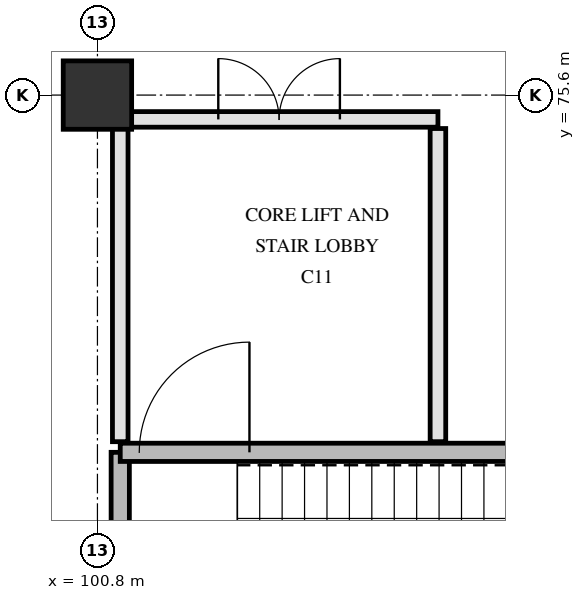
"""IFC4 building model, lengths in metres.
Left out: names, types, materials, properties, quantities, classifications, styles, units other than length and angle.
Written with IfcOpenShell. Run it as: python <this file> out.ifc"""

import sys

from ifc_helpers import new_model, si_unit, direction, frame, frame_2d, origin, origin_2d, place, context, subcontext, project, spatial, rectangle, extrude, element, fill, save


model = new_model("IFC4")
c1 = context("Model", 3, precision=1e-05, world=origin(), true_north=direction((0.0, 1.0)))
c2 = subcontext(c1, "Body", "Model", "MODEL_VIEW")
j1 = project(units=[si_unit("LENGTHUNIT", "METRE"), si_unit("PLANEANGLEUNIT", "RADIAN")], contexts=[c1])
p1 = place(None, origin())
s1 = spatial("IfcSite", under=j1, at=p1, CompositionType="ELEMENT")
p2 = place(p1, origin())
s2 = spatial("IfcBuilding", under=s1, at=p2, CompositionType="ELEMENT")
p3 = place(p2, frame((0.0, 0.0, -5.4)))
s3 = spatial("IfcBuildingStorey", under=s2, at=p3, CompositionType="ELEMENT", Elevation=-5.4)
p4 = place(p3, frame((100.8, 75.6, 0.0), z_axis=(0.0, 0.0, 1.0), x_axis=(1.0, 0.0, 0.0)))
e1 = element("IfcColumn", 1, at=p4, inside=s3, PredefinedType="COLUMN", context=c2, shape_type="SweptSolid", body=[
    extrude(rectangle(XDim=0.9, YDim=0.9, at=origin_2d()), origin(), (0.0, 0.0, 1.0), 5.4),
])
p5 = place(p3, frame((101.1, 67.58, 0.0), z_axis=(0.0, 0.0, 1.0), x_axis=(0.0, 1.0, 0.0)))
e2 = element("IfcWall", 2, at=p5, inside=s3, PredefinedType="SHEAR", context=c2, shape_type="SweptSolid", body=[
    extrude(rectangle(XDim=3.32, YDim=0.24, at=frame_2d((1.66, 0.0))), origin(), (0.0, 0.0, 1.0), 5.08),
])
p6 = place(p3, frame((101.1, 70.9, 0.0), z_axis=(0.0, 0.0, 1.0), x_axis=(1.0, 0.0, 0.0)))
e3 = element("IfcWall", 3, at=p6, inside=s3, PredefinedType="SHEAR", context=c2, shape_type="SweptSolid", body=[
    extrude(rectangle(XDim=7.82, YDim=0.24, at=frame_2d((3.91, 0.0))), origin(), (0.0, 0.0, 1.0), 5.08),
])
p7 = place(p6, frame((0.25, 0.0, 0.0)))
e4 = element("IfcOpeningElement", 4, at=p7, cuts=e3, PredefinedType="OPENING", context=c2, shape_type="SweptSolid", body=[
    extrude(rectangle(XDim=1.45, YDim=2.2, at=frame_2d((0.725, 1.1))), frame((0.0, 0.13, 0.0), z_axis=(0.0, -1.0, 0.0), x_axis=(1.0, 0.0, 0.0)), (0.0, 0.0, 1.0), 0.26),
])
p8 = place(p3, frame((105.28, 71.04, 0.0), z_axis=(0.0, 0.0, 1.0), x_axis=(0.0, 1.0, 0.0)))
e5 = element("IfcWall", 5, at=p8, inside=s3, PredefinedType="PARTITIONING", context=c2, shape_type="SweptSolid", body=[
    extrude(rectangle(XDim=4.12, YDim=0.205, at=frame_2d((2.06, 0.0))), origin(), (0.0, 0.0, 1.0), 5.07),
])
p9 = place(p3, frame((101.1, 71.04, 0.0), z_axis=(0.0, 0.0, 1.0), x_axis=(0.0, 1.0, 0.0)))
e6 = element("IfcWall", 6, at=p9, inside=s3, PredefinedType="PARTITIONING", context=c2, shape_type="SweptSolid", body=[
    extrude(rectangle(XDim=4.12, YDim=0.205, at=frame_2d((2.06, 0.0))), origin(), (0.0, 0.0, 1.0), 4.47),
])
p10 = place(p3, frame((101.1, 75.28, 0.0), z_axis=(0.0, 0.0, 1.0), x_axis=(1.0, 0.0, 0.0)))
e7 = element("IfcWall", 7, at=p10, inside=s3, PredefinedType="PARTITIONING", context=c2, shape_type="SweptSolid", body=[
    extrude(rectangle(XDim=4.18, YDim=0.205, at=frame_2d((2.09, 0.0))), origin(), (0.0, 0.0, 1.0), 4.42),
])
p11 = place(p10, frame((1.29, 0.0, 0.0)))
e8 = element("IfcOpeningElement", 8, at=p11, cuts=e7, PredefinedType="OPENING", context=c2, shape_type="SweptSolid", body=[
    extrude(rectangle(XDim=1.6, YDim=2.25, at=frame_2d((0.8, 1.125))), frame((0.0, 0.113, 0.0), z_axis=(0.0, -1.0, 0.0), x_axis=(1.0, 0.0, 0.0)), (0.0, 0.0, 1.0), 0.225),
])
p12 = place(p7, origin())
e9 = element("IfcDoor", 9, at=p12, inside=s3, OperationType="SINGLE_SWING_RIGHT", PredefinedType="DOOR", context=c2, shape_type="SweptSolid", body=[
    extrude(rectangle(XDim=1.45, YDim=2.2, at=frame_2d((0.725, 1.1))), frame((0.0, 0.025, 0.0), z_axis=(0.0, -1.0, 0.0), x_axis=(1.0, 0.0, 0.0)), (0.0, 0.0, 1.0), 0.05),
])
fill(e4, e9)
p13 = place(p11, origin())
e10 = element("IfcDoor", 10, at=p13, inside=s3, OperationType="DOUBLE_SWING_LEFT", PredefinedType="DOOR", context=c2, shape_type="SweptSolid", body=[
    extrude(rectangle(XDim=1.6, YDim=2.25, at=frame_2d((0.8, 1.125))), frame((0.0, 0.025, 0.0), z_axis=(0.0, -1.0, 0.0), x_axis=(1.0, 0.0, 0.0)), (0.0, 0.0, 1.0), 0.05),
])
fill(e8, e10)
save(model, sys.argv[1])
